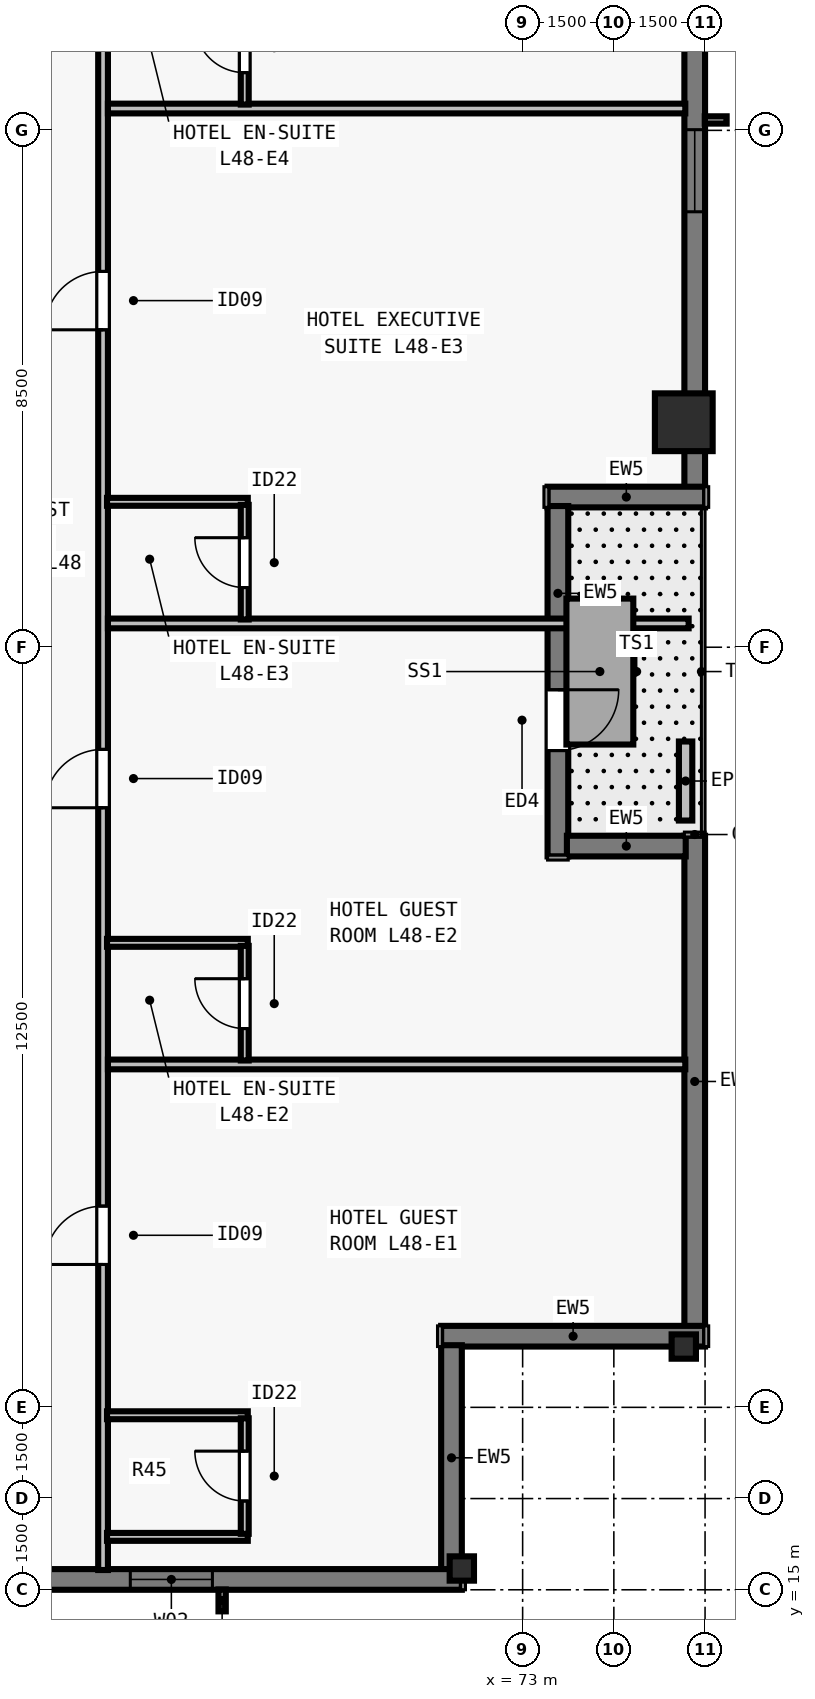
"""IFC4 building model, lengths in metres.
Left out: names, types, materials, properties, quantities, classifications, styles, units other than length and angle.
Written with IfcOpenShell. Run it as: python <this file> out.ifc"""

import sys

from ifc_helpers import new_model, si_unit, direction, frame, frame_2d, origin, origin_2d, place, context, subcontext, project, spatial, rectangle, i_section, extrude, element, fill, save


model = new_model("IFC4")
c1 = context("Model", 3, precision=1e-05, world=origin(), true_north=direction((0.0, 1.0)))
c2 = subcontext(c1, "Body", "Model", "MODEL_VIEW")
j1 = project(units=[si_unit("LENGTHUNIT", "METRE"), si_unit("PLANEANGLEUNIT", "RADIAN")], contexts=[c1])
p1 = place(None, origin())
s1 = spatial("IfcSite", under=j1, at=p1, CompositionType="ELEMENT")
p2 = place(p1, origin())
s2 = spatial("IfcBuilding", under=s1, at=p2, CompositionType="ELEMENT")
p3 = place(p2, frame((0.0, 0.0, 176.0)))
s3 = spatial("IfcBuildingStorey", under=s2, at=p3, CompositionType="ELEMENT", Elevation=176.0)
for number, where, z_axis, x_axis in (
    (1, (72.0, 15.35, 0.0), (0.0, 0.0, 1.0), (1.0, 0.0, 0.0)),
    (2, (75.65, 19.0, 0.0), (0.0, 0.0, 1.0), (0.0, 1.0, 0.0)),
):
    element("IfcColumn", number, at=place(p3, frame(where, z_axis=z_axis, x_axis=x_axis)), inside=s3, PredefinedType="COLUMN", context=c2, shape_type="SweptSolid", body=[
        extrude(i_section(OverallWidth=0.4, OverallDepth=0.4, WebThickness=0.022, FlangeThickness=0.036, at=origin_2d()), origin(), (0.0, 0.0, 1.0), 3.5),
    ])
p4 = place(p3, frame((75.65, 34.2, 0.0), z_axis=(0.0, 0.0, 1.0), x_axis=(0.0, 1.0, 0.0)))
e3 = element("IfcColumn", 3, at=p4, inside=s3, PredefinedType="COLUMN", context=c2, shape_type="SweptSolid", body=[
    extrude(rectangle(XDim=0.95, YDim=0.95, at=origin_2d()), origin(), (0.0, 0.0, 1.0), 3.5),
])
p5 = place(p3, frame((75.83, 27.4, 0.0), z_axis=(0.0, 0.0, 1.0), x_axis=(0.0, -1.0, 0.0)))
e4 = element("IfcWall", 4, at=p5, inside=s3, PredefinedType="SOLIDWALL", context=c2, shape_type="SweptSolid", body=[
    extrude(rectangle(XDim=8.082, YDim=0.34, at=frame_2d((4.041, 0.0))), origin(), (0.0, 0.0, 1.0), 3.28),
])
p6 = place(p3, frame((76.0, 19.17, 0.0), z_axis=(0.0, 0.0, 1.0), x_axis=(-1.0, 0.0, 0.0)))
e5 = element("IfcWall", 5, at=p6, inside=s3, PredefinedType="SOLIDWALL", context=c2, shape_type="SweptSolid", body=[
    extrude(rectangle(XDim=4.34, YDim=0.34, at=frame_2d((2.17, 0.0))), origin(), (0.0, 0.0, 1.0), 3.28),
])
p7 = place(p3, frame((71.83, 19.022, 0.0), z_axis=(0.0, 0.0, 1.0), x_axis=(0.0, -1.0, 0.0)))
e6 = element("IfcWall", 6, at=p7, inside=s3, PredefinedType="SOLIDWALL", context=c2, shape_type="SweptSolid", body=[
    extrude(rectangle(XDim=3.704, YDim=0.34, at=frame_2d((1.852, 0.0))), origin(), (0.0, 0.0, 1.0), 3.28),
])
p8 = place(p3, frame((72.0, 15.17, 0.0), z_axis=(0.0, 0.0, 1.0), x_axis=(-1.0, 0.0, 0.0)))
e7 = element("IfcWall", 7, at=p8, inside=s3, PredefinedType="SOLIDWALL", context=c2, shape_type="SweptSolid", body=[
    extrude(rectangle(XDim=39.682, YDim=0.34, at=frame_2d((19.841, 0.0))), origin(), (0.0, 0.0, 1.0), 3.28),
])
p9 = place(p8, frame((4.102, 0.0, 0.8)))
e8 = element("IfcOpeningElement", 8, at=p9, cuts=e7, PredefinedType="OPENING", context=c2, shape_type="SweptSolid", body=[
    extrude(rectangle(XDim=1.35, YDim=1.66, at=frame_2d((0.675, 0.83))), frame((0.0, 0.18, 0.0), z_axis=(0.0, -1.0, 0.0), x_axis=(1.0, 0.0, 0.0)), (0.0, 0.0, 1.0), 0.36),
])
p10 = place(p8, frame((8.305, 0.0, 0.8)))
e9 = element("IfcOpeningElement", 9, at=p10, cuts=e7, PredefinedType="OPENING", context=c2, shape_type="SweptSolid", body=[
    extrude(rectangle(XDim=1.75, YDim=1.66, at=frame_2d((0.875, 0.83))), frame((0.0, 0.18, 0.0), z_axis=(0.0, -1.0, 0.0), x_axis=(1.0, 0.0, 0.0)), (0.0, 0.0, 1.0), 0.36),
])
p11 = place(p8, frame((12.059, 0.0, 0.8)))
e10 = element("IfcOpeningElement", 10, at=p11, cuts=e7, PredefinedType="OPENING", context=c2, shape_type="SweptSolid", body=[
    extrude(rectangle(XDim=1.35, YDim=1.66, at=frame_2d((0.675, 0.83))), frame((0.0, 0.18, 0.0), z_axis=(0.0, -1.0, 0.0), x_axis=(1.0, 0.0, 0.0)), (0.0, 0.0, 1.0), 0.36),
])
p12 = place(p8, frame((16.262, 0.0, 0.8)))
e11 = element("IfcOpeningElement", 11, at=p12, cuts=e7, PredefinedType="OPENING", context=c2, shape_type="SweptSolid", body=[
    extrude(rectangle(XDim=1.75, YDim=1.66, at=frame_2d((0.875, 0.83))), frame((0.0, 0.18, 0.0), z_axis=(0.0, -1.0, 0.0), x_axis=(1.0, 0.0, 0.0)), (0.0, 0.0, 1.0), 0.36),
])
p13 = place(p8, frame((19.166, 0.0, 0.8)))
e12 = element("IfcOpeningElement", 12, at=p13, cuts=e7, PredefinedType="OPENING", context=c2, shape_type="SweptSolid", body=[
    extrude(rectangle(XDim=1.35, YDim=1.66, at=frame_2d((0.675, 0.83))), frame((0.0, 0.18, 0.0), z_axis=(0.0, -1.0, 0.0), x_axis=(1.0, 0.0, 0.0)), (0.0, 0.0, 1.0), 0.36),
])
p14 = place(p8, frame((21.27, 0.0, 0.8)))
e13 = element("IfcOpeningElement", 13, at=p14, cuts=e7, PredefinedType="OPENING", context=c2, shape_type="SweptSolid", body=[
    extrude(rectangle(XDim=1.75, YDim=1.66, at=frame_2d((0.875, 0.83))), frame((0.0, 0.18, 0.0), z_axis=(0.0, -1.0, 0.0), x_axis=(1.0, 0.0, 0.0)), (0.0, 0.0, 1.0), 0.36),
])
p15 = place(p8, frame((26.273, 0.0, 0.8)))
e14 = element("IfcOpeningElement", 14, at=p15, cuts=e7, PredefinedType="OPENING", context=c2, shape_type="SweptSolid", body=[
    extrude(rectangle(XDim=1.35, YDim=1.66, at=frame_2d((0.675, 0.83))), frame((0.0, 0.18, 0.0), z_axis=(0.0, -1.0, 0.0), x_axis=(1.0, 0.0, 0.0)), (0.0, 0.0, 1.0), 0.36),
])
p16 = place(p8, frame((32.93, 0.0, 0.8)))
e15 = element("IfcOpeningElement", 15, at=p16, cuts=e7, PredefinedType="OPENING", context=c2, shape_type="SweptSolid", body=[
    extrude(rectangle(XDim=1.35, YDim=1.66, at=frame_2d((0.675, 0.83))), frame((0.0, 0.18, 0.0), z_axis=(0.0, -1.0, 0.0), x_axis=(1.0, 0.0, 0.0)), (0.0, 0.0, 1.0), 0.36),
])
p17 = place(p3, frame((75.83, 59.0, 0.0), z_axis=(0.0, 0.0, 1.0), x_axis=(0.0, -1.0, 0.0)))
e16 = element("IfcWall", 16, at=p17, inside=s3, PredefinedType="SOLIDWALL", context=c2, shape_type="SweptSolid", body=[
    extrude(rectangle(XDim=25.882, YDim=0.34, at=frame_2d((12.941, 0.0))), origin(), (0.0, 0.0, 1.0), 3.28),
])
p18 = place(p17, frame((4.993, 0.0, 0.8)))
e17 = element("IfcOpeningElement", 17, at=p18, cuts=e16, PredefinedType="OPENING", context=c2, shape_type="SweptSolid", body=[
    extrude(rectangle(XDim=1.35, YDim=1.66, at=frame_2d((0.675, 0.83))), frame((0.0, 0.18, 0.0), z_axis=(0.0, -1.0, 0.0), x_axis=(1.0, 0.0, 0.0)), (0.0, 0.0, 1.0), 0.36),
])
p19 = place(p17, frame((8.43, 0.0, 0.8)))
e18 = element("IfcOpeningElement", 18, at=p19, cuts=e16, PredefinedType="OPENING", context=c2, shape_type="SweptSolid", body=[
    extrude(rectangle(XDim=1.75, YDim=1.66, at=frame_2d((0.875, 0.83))), frame((0.0, 0.18, 0.0), z_axis=(0.0, -1.0, 0.0), x_axis=(1.0, 0.0, 0.0)), (0.0, 0.0, 1.0), 0.36),
])
p20 = place(p17, frame((12.716, 0.0, 0.8)))
e19 = element("IfcOpeningElement", 19, at=p20, cuts=e16, PredefinedType="OPENING", context=c2, shape_type="SweptSolid", body=[
    extrude(rectangle(XDim=1.35, YDim=1.66, at=frame_2d((0.675, 0.83))), frame((0.0, 0.18, 0.0), z_axis=(0.0, -1.0, 0.0), x_axis=(1.0, 0.0, 0.0)), (0.0, 0.0, 1.0), 0.36),
])
p21 = place(p17, frame((16.152, 0.0, 0.8)))
e20 = element("IfcOpeningElement", 20, at=p21, cuts=e16, PredefinedType="OPENING", context=c2, shape_type="SweptSolid", body=[
    extrude(rectangle(XDim=1.75, YDim=1.66, at=frame_2d((0.875, 0.83))), frame((0.0, 0.18, 0.0), z_axis=(0.0, -1.0, 0.0), x_axis=(1.0, 0.0, 0.0)), (0.0, 0.0, 1.0), 0.36),
])
p22 = place(p17, frame((19.989, 0.0, 0.8)))
e21 = element("IfcOpeningElement", 21, at=p22, cuts=e16, PredefinedType="OPENING", context=c2, shape_type="SweptSolid", body=[
    extrude(rectangle(XDim=1.35, YDim=1.66, at=frame_2d((0.675, 0.83))), frame((0.0, 0.18, 0.0), z_axis=(0.0, -1.0, 0.0), x_axis=(1.0, 0.0, 0.0)), (0.0, 0.0, 1.0), 0.36),
])
p23 = place(p3, frame((76.0, 32.97, 0.0), z_axis=(0.0, 0.0, 1.0), x_axis=(-1.0, 0.0, 0.0)))
e22 = element("IfcWall", 22, at=p23, inside=s3, PredefinedType="SOLIDWALL", context=c2, shape_type="SweptSolid", body=[
    extrude(rectangle(XDim=2.59, YDim=0.34, at=frame_2d((1.295, 0.0))), origin(), (0.0, 0.0, 1.0), 3.28),
])
p24 = place(p3, frame((73.58, 32.822, 0.0), z_axis=(0.0, 0.0, 1.0), x_axis=(0.0, -1.0, 0.0)))
e23 = element("IfcWall", 23, at=p24, inside=s3, PredefinedType="SOLIDWALL", context=c2, shape_type="SweptSolid", body=[
    extrude(rectangle(XDim=5.762, YDim=0.34, at=frame_2d((2.881, 0.0))), origin(), (0.0, 0.0, 1.0), 3.28),
])
p25 = place(p24, frame((3.021, 0.0, 0.0)))
e24 = element("IfcOpeningElement", 24, at=p25, cuts=e23, PredefinedType="OPENING", context=c2, shape_type="SweptSolid", body=[
    extrude(rectangle(XDim=1.0, YDim=2.15, at=frame_2d((0.5, 1.075))), frame((0.0, 0.18, 0.0), z_axis=(0.0, -1.0, 0.0), x_axis=(1.0, 0.0, 0.0)), (0.0, 0.0, 1.0), 0.36),
])
p26 = place(p3, frame((73.728, 27.23, 0.0), z_axis=(0.0, 0.0, 1.0), x_axis=(1.0, 0.0, 0.0)))
e25 = element("IfcWall", 25, at=p26, inside=s3, PredefinedType="SOLIDWALL", context=c2, shape_type="SweptSolid", body=[
    extrude(rectangle(XDim=1.954, YDim=0.34, at=frame_2d((0.977, 0.0))), origin(), (0.0, 0.0, 1.0), 3.28),
])
p27 = place(p3, frame((75.68, 27.65, 0.0), z_axis=(0.0, 0.0, 1.0), x_axis=(0.0, 1.0, 0.0)))
e26 = element("IfcWall", 26, at=p27, inside=s3, PredefinedType="PARAPET", context=c2, shape_type="SweptSolid", body=[
    extrude(rectangle(XDim=1.3, YDim=0.22, at=frame_2d((0.65, 0.0))), origin(), (0.0, 0.0, 1.0), 0.55),
])
p28 = place(p3, frame((66.1, 15.325, 0.0), z_axis=(0.0, 0.0, 1.0), x_axis=(0.0, 1.0, 0.0)))
e27 = element("IfcWall", 27, at=p28, inside=s3, PredefinedType="PARTITIONING", context=c2, shape_type="SweptSolid", body=[
    extrude(rectangle(XDim=47.35, YDim=0.16, at=frame_2d((23.675, 0.0))), origin(), (0.0, 0.0, 1.0), 2.555),
])
p29 = place(p28, frame((5.025, 0.0, 0.0)))
e28 = element("IfcOpeningElement", 28, at=p29, cuts=e27, PredefinedType="OPENING", context=c2, shape_type="SweptSolid", body=[
    extrude(rectangle(XDim=0.96, YDim=2.15, at=frame_2d((0.48, 1.075))), frame((0.0, 0.09, 0.0), z_axis=(0.0, -1.0, 0.0), x_axis=(1.0, 0.0, 0.0)), (0.0, 0.0, 1.0), 0.18),
])
p30 = place(p28, frame((12.535, 0.0, 0.0)))
e29 = element("IfcOpeningElement", 29, at=p30, cuts=e27, PredefinedType="OPENING", context=c2, shape_type="SweptSolid", body=[
    extrude(rectangle(XDim=0.96, YDim=2.15, at=frame_2d((0.48, 1.075))), frame((0.0, 0.09, 0.0), z_axis=(0.0, -1.0, 0.0), x_axis=(1.0, 0.0, 0.0)), (0.0, 0.0, 1.0), 0.18),
])
p31 = place(p28, frame((20.395, 0.0, 0.0)))
e30 = element("IfcOpeningElement", 30, at=p31, cuts=e27, PredefinedType="OPENING", context=c2, shape_type="SweptSolid", body=[
    extrude(rectangle(XDim=0.96, YDim=2.15, at=frame_2d((0.48, 1.075))), frame((0.0, 0.09, 0.0), z_axis=(0.0, -1.0, 0.0), x_axis=(1.0, 0.0, 0.0)), (0.0, 0.0, 1.0), 0.18),
])
p32 = place(p28, frame((28.255, 0.0, 0.0)))
e31 = element("IfcOpeningElement", 31, at=p32, cuts=e27, PredefinedType="OPENING", context=c2, shape_type="SweptSolid", body=[
    extrude(rectangle(XDim=0.96, YDim=2.15, at=frame_2d((0.48, 1.075))), frame((0.0, 0.09, 0.0), z_axis=(0.0, -1.0, 0.0), x_axis=(1.0, 0.0, 0.0)), (0.0, 0.0, 1.0), 0.18),
])
p33 = place(p28, frame((36.115, 0.0, 0.0)))
e32 = element("IfcOpeningElement", 32, at=p33, cuts=e27, PredefinedType="OPENING", context=c2, shape_type="SweptSolid", body=[
    extrude(rectangle(XDim=0.96, YDim=2.15, at=frame_2d((0.48, 1.075))), frame((0.0, 0.09, 0.0), z_axis=(0.0, -1.0, 0.0), x_axis=(1.0, 0.0, 0.0)), (0.0, 0.0, 1.0), 0.18),
])
p34 = place(p28, frame((44.1, 0.0, 0.0)))
e33 = element("IfcOpeningElement", 33, at=p34, cuts=e27, PredefinedType="OPENING", context=c2, shape_type="SweptSolid", body=[
    extrude(rectangle(XDim=0.96, YDim=2.15, at=frame_2d((0.48, 1.075))), frame((0.0, 0.09, 0.0), z_axis=(0.0, -1.0, 0.0), x_axis=(1.0, 0.0, 0.0)), (0.0, 0.0, 1.0), 0.18),
])
for number, where, z_axis, x_axis in (
    (34, (66.165, 15.87, 0.0), (0.0, 0.0, 1.0), (1.0, 0.0, 0.0)),
    (35, (66.165, 17.87, 0.0), (0.0, 0.0, 1.0), (1.0, 0.0, 0.0)),
):
    element("IfcWall", number, at=place(p3, frame(where, z_axis=z_axis, x_axis=x_axis)), inside=s3, PredefinedType="PLUMBINGWALL", context=c2, shape_type="SweptSolid", body=[
        extrude(rectangle(XDim=2.315, YDim=0.13, at=frame_2d((1.157, 0.0))), origin(), (0.0, 0.0, 1.0), 3.28),
    ])
p35 = place(p3, frame((68.43, 15.92, 0.0), z_axis=(0.0, 0.0, 1.0), x_axis=(0.0, 1.0, 0.0)))
e36 = element("IfcWall", 36, at=p35, inside=s3, PredefinedType="PLUMBINGWALL", context=c2, shape_type="SweptSolid", body=[
    extrude(rectangle(XDim=1.9, YDim=0.13, at=frame_2d((0.95, 0.0))), origin(), (0.0, 0.0, 1.0), 3.28),
])
p36 = place(p35, frame((0.54, 0.0, 0.0)))
e37 = element("IfcOpeningElement", 37, at=p36, cuts=e36, PredefinedType="OPENING", context=c2, shape_type="SweptSolid", body=[
    extrude(rectangle(XDim=0.82, YDim=2.1, at=frame_2d((0.41, 1.05))), frame((0.0, 0.075, 0.0), z_axis=(0.0, -1.0, 0.0), x_axis=(1.0, 0.0, 0.0)), (0.0, 0.0, 1.0), 0.15),
])
p37 = place(p3, frame((66.18, 23.639, 0.0), z_axis=(0.0, 0.0, 1.0), x_axis=(1.0, 0.0, 0.0)))
e38 = element("IfcWall", 38, at=p37, inside=s3, PredefinedType="PARTITIONING", context=c2, shape_type="SweptSolid", body=[
    extrude(rectangle(XDim=9.495, YDim=0.16, at=frame_2d((4.748, 0.0))), origin(), (0.0, 0.0, 1.0), 2.896),
])
p38 = place(p3, frame((66.165, 25.639, 0.0), z_axis=(0.0, 0.0, 1.0), x_axis=(1.0, 0.0, 0.0)))
e39 = element("IfcWall", 39, at=p38, inside=s3, PredefinedType="PLUMBINGWALL", context=c2, shape_type="SweptSolid", body=[
    extrude(rectangle(XDim=2.315, YDim=0.13, at=frame_2d((1.157, 0.0))), origin(), (0.0, 0.0, 1.0), 2.896),
])
p39 = place(p3, frame((68.43, 23.704, 0.0), z_axis=(0.0, 0.0, 1.0), x_axis=(0.0, 1.0, 0.0)))
e40 = element("IfcWall", 40, at=p39, inside=s3, PredefinedType="PLUMBINGWALL", context=c2, shape_type="SweptSolid", body=[
    extrude(rectangle(XDim=1.885, YDim=0.13, at=frame_2d((0.942, 0.0))), origin(), (0.0, 0.0, 1.0), 3.28),
])
p40 = place(p39, frame((0.525, 0.0, 0.0)))
e41 = element("IfcOpeningElement", 41, at=p40, cuts=e40, PredefinedType="OPENING", context=c2, shape_type="SweptSolid", body=[
    extrude(rectangle(XDim=0.82, YDim=2.1, at=frame_2d((0.41, 1.05))), frame((0.0, 0.075, 0.0), z_axis=(0.0, -1.0, 0.0), x_axis=(1.0, 0.0, 0.0)), (0.0, 0.0, 1.0), 0.15),
])
p41 = place(p3, frame((66.18, 30.891, 0.0), z_axis=(0.0, 0.0, 1.0), x_axis=(1.0, 0.0, 0.0)))
e42 = element("IfcWall", 42, at=p41, inside=s3, PredefinedType="PARTITIONING", context=c2, shape_type="SweptSolid", body=[
    extrude(rectangle(XDim=9.55, YDim=0.16, at=frame_2d((4.775, 0.0))), origin(), (0.0, 0.0, 1.0), 3.28),
])
p42 = place(p3, frame((66.165, 32.891, 0.0), z_axis=(0.0, 0.0, 1.0), x_axis=(1.0, 0.0, 0.0)))
e43 = element("IfcWall", 43, at=p42, inside=s3, PredefinedType="PLUMBINGWALL", context=c2, shape_type="SweptSolid", body=[
    extrude(rectangle(XDim=2.315, YDim=0.13, at=frame_2d((1.157, 0.0))), origin(), (0.0, 0.0, 1.0), 3.28),
])
p43 = place(p3, frame((68.43, 30.956, 0.0), z_axis=(0.0, 0.0, 1.0), x_axis=(0.0, 1.0, 0.0)))
e44 = element("IfcWall", 44, at=p43, inside=s3, PredefinedType="PLUMBINGWALL", context=c2, shape_type="SweptSolid", body=[
    extrude(rectangle(XDim=1.885, YDim=0.13, at=frame_2d((0.942, 0.0))), origin(), (0.0, 0.0, 1.0), 3.28),
])
p44 = place(p43, frame((0.525, 0.0, 0.0)))
e45 = element("IfcOpeningElement", 45, at=p44, cuts=e44, PredefinedType="OPENING", context=c2, shape_type="SweptSolid", body=[
    extrude(rectangle(XDim=0.82, YDim=2.1, at=frame_2d((0.41, 1.05))), frame((0.0, 0.075, 0.0), z_axis=(0.0, -1.0, 0.0), x_axis=(1.0, 0.0, 0.0)), (0.0, 0.0, 1.0), 0.15),
])
p45 = place(p3, frame((66.18, 39.359, 0.0), z_axis=(0.0, 0.0, 1.0), x_axis=(1.0, 0.0, 0.0)))
e46 = element("IfcWall", 46, at=p45, inside=s3, PredefinedType="PARTITIONING", context=c2, shape_type="SweptSolid", body=[
    extrude(rectangle(XDim=9.495, YDim=0.16, at=frame_2d((4.748, 0.0))), origin(), (0.0, 0.0, 1.0), 3.28),
])
p46 = place(p3, frame((68.43, 39.424, 0.0), z_axis=(0.0, 0.0, 1.0), x_axis=(0.0, 1.0, 0.0)))
e47 = element("IfcWall", 47, at=p46, inside=s3, PredefinedType="PLUMBINGWALL", context=c2, shape_type="SweptSolid", body=[
    extrude(rectangle(XDim=1.885, YDim=0.13, at=frame_2d((0.942, 0.0))), origin(), (0.0, 0.0, 1.0), 3.28),
])
p47 = place(p46, frame((0.525, 0.0, 0.0)))
e48 = element("IfcOpeningElement", 48, at=p47, cuts=e47, PredefinedType="OPENING", context=c2, shape_type="SweptSolid", body=[
    extrude(rectangle(XDim=0.82, YDim=2.1, at=frame_2d((0.41, 1.05))), frame((0.0, 0.075, 0.0), z_axis=(0.0, -1.0, 0.0), x_axis=(1.0, 0.0, 0.0)), (0.0, 0.0, 1.0), 0.15),
])
p48 = place(p9, origin())
e49 = element("IfcWindow", 49, at=p48, inside=s3, PartitioningType="SINGLE_PANEL", PredefinedType="WINDOW", context=c2, shape_type="SweptSolid", body=[
    extrude(rectangle(XDim=1.35, YDim=1.66, at=frame_2d((0.675, 0.83))), frame((0.0, -0.05, 0.0), z_axis=(0.0, -1.0, 0.0), x_axis=(1.0, 0.0, 0.0)), (0.0, 0.0, 1.0), 0.06),
])
fill(e8, e49)
p49 = place(p22, origin())
e50 = element("IfcWindow", 50, at=p49, inside=s3, PartitioningType="SINGLE_PANEL", PredefinedType="WINDOW", context=c2, shape_type="SweptSolid", body=[
    extrude(rectangle(XDim=1.35, YDim=1.66, at=frame_2d((0.675, 0.83))), frame((0.0, -0.05, 0.0), z_axis=(0.0, -1.0, 0.0), x_axis=(1.0, 0.0, 0.0)), (0.0, 0.0, 1.0), 0.06),
])
fill(e21, e50)
p50 = place(p25, origin())
e51 = element("IfcDoor", 51, at=p50, inside=s3, OperationType="SINGLE_SWING_LEFT", PredefinedType="DOOR", context=c2, shape_type="SweptSolid", body=[
    extrude(rectangle(XDim=1.0, YDim=2.15, at=frame_2d((0.5, 1.075))), frame((0.0, 0.025, 0.0), z_axis=(0.0, -1.0, 0.0), x_axis=(1.0, 0.0, 0.0)), (0.0, 0.0, 1.0), 0.05),
])
fill(e24, e51)
p51 = place(p36, origin())
e52 = element("IfcDoor", 52, at=p51, inside=s3, OperationType="SINGLE_SWING_RIGHT", PredefinedType="DOOR", context=c2, shape_type="SweptSolid", body=[
    extrude(rectangle(XDim=0.82, YDim=2.1, at=frame_2d((0.41, 1.05))), frame((0.0, 0.025, 0.0), z_axis=(0.0, -1.0, 0.0), x_axis=(1.0, 0.0, 0.0)), (0.0, 0.0, 1.0), 0.05),
])
fill(e37, e52)
p52 = place(p29, origin())
e53 = element("IfcDoor", 53, at=p52, inside=s3, OperationType="SINGLE_SWING_LEFT", PredefinedType="DOOR", context=c2, shape_type="SweptSolid", body=[
    extrude(rectangle(XDim=0.96, YDim=2.15, at=frame_2d((0.48, 1.075))), frame((0.0, 0.025, 0.0), z_axis=(0.0, -1.0, 0.0), x_axis=(1.0, 0.0, 0.0)), (0.0, 0.0, 1.0), 0.05),
])
fill(e28, e53)
p53 = place(p40, origin())
e54 = element("IfcDoor", 54, at=p53, inside=s3, OperationType="SINGLE_SWING_RIGHT", PredefinedType="DOOR", context=c2, shape_type="SweptSolid", body=[
    extrude(rectangle(XDim=0.82, YDim=2.1, at=frame_2d((0.41, 1.05))), frame((0.0, 0.025, 0.0), z_axis=(0.0, -1.0, 0.0), x_axis=(1.0, 0.0, 0.0)), (0.0, 0.0, 1.0), 0.05),
])
fill(e41, e54)
p54 = place(p30, origin())
e55 = element("IfcDoor", 55, at=p54, inside=s3, OperationType="SINGLE_SWING_LEFT", PredefinedType="DOOR", context=c2, shape_type="SweptSolid", body=[
    extrude(rectangle(XDim=0.96, YDim=2.15, at=frame_2d((0.48, 1.075))), frame((0.0, 0.025, 0.0), z_axis=(0.0, -1.0, 0.0), x_axis=(1.0, 0.0, 0.0)), (0.0, 0.0, 1.0), 0.05),
])
fill(e29, e55)
p55 = place(p44, origin())
e56 = element("IfcDoor", 56, at=p55, inside=s3, OperationType="SINGLE_SWING_RIGHT", PredefinedType="DOOR", context=c2, shape_type="SweptSolid", body=[
    extrude(rectangle(XDim=0.82, YDim=2.1, at=frame_2d((0.41, 1.05))), frame((0.0, 0.025, 0.0), z_axis=(0.0, -1.0, 0.0), x_axis=(1.0, 0.0, 0.0)), (0.0, 0.0, 1.0), 0.05),
])
fill(e45, e56)
p56 = place(p31, origin())
e57 = element("IfcDoor", 57, at=p56, inside=s3, OperationType="SINGLE_SWING_LEFT", PredefinedType="DOOR", context=c2, shape_type="SweptSolid", body=[
    extrude(rectangle(XDim=0.96, YDim=2.15, at=frame_2d((0.48, 1.075))), frame((0.0, 0.025, 0.0), z_axis=(0.0, -1.0, 0.0), x_axis=(1.0, 0.0, 0.0)), (0.0, 0.0, 1.0), 0.05),
])
fill(e30, e57)
p57 = place(p47, origin())
e58 = element("IfcDoor", 58, at=p57, inside=s3, OperationType="SINGLE_SWING_RIGHT", PredefinedType="DOOR", context=c2, shape_type="SweptSolid", body=[
    extrude(rectangle(XDim=0.82, YDim=2.1, at=frame_2d((0.41, 1.05))), frame((0.0, 0.025, 0.0), z_axis=(0.0, -1.0, 0.0), x_axis=(1.0, 0.0, 0.0)), (0.0, 0.0, 1.0), 0.05),
])
fill(e48, e58)
save(model, sys.argv[1])
